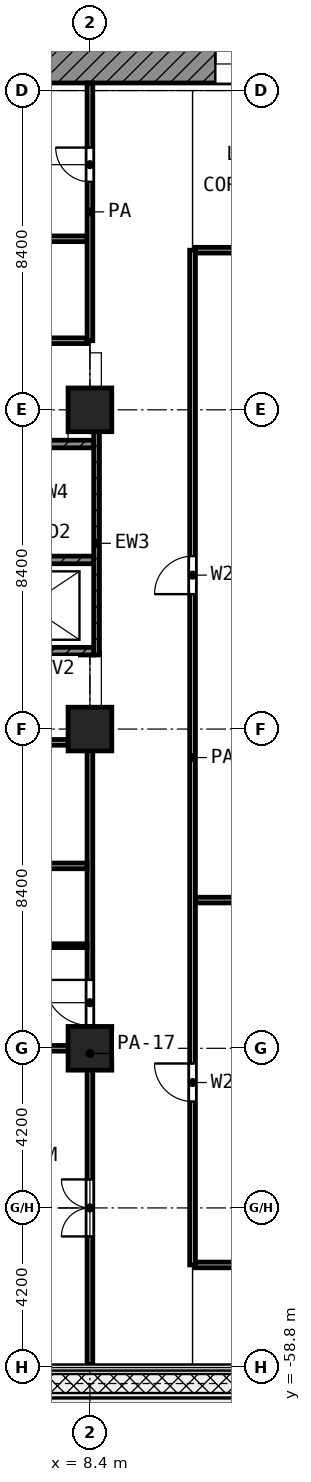
"""IFC4 building model, lengths in metres.
Left out: names, types, materials, properties, quantities, classifications, styles, units other than length and angle.
Written with IfcOpenShell. Run it as: python <this file> out.ifc"""

import sys

from ifc_helpers import new_model, si_unit, direction, frame, frame_2d, origin, origin_2d, place, context, subcontext, project, spatial, rectangle, extrude, element, fill, save


model = new_model("IFC4")
c1 = context("Model", 3, precision=1e-05, world=origin(), true_north=direction((0.0, 1.0)))
c2 = subcontext(c1, "Body", "Model", "MODEL_VIEW")
j1 = project(units=[si_unit("LENGTHUNIT", "METRE"), si_unit("PLANEANGLEUNIT", "RADIAN")], contexts=[c1])
p1 = place(None, origin())
s1 = spatial("IfcSite", under=j1, at=p1, CompositionType="ELEMENT")
p2 = place(p1, origin())
s2 = spatial("IfcBuilding", under=s1, at=p2, CompositionType="ELEMENT")
p3 = place(p2, frame((0.0, 0.0, 115.6)))
s3 = spatial("IfcBuildingStorey", under=s2, at=p3, CompositionType="ELEMENT", Elevation=115.6)
for number, where, z_axis, x_axis in (
    (1, (8.4, -33.6, 0.0), (0.0, 0.0, 1.0), (1.0, 0.0, 0.0)),
    (2, (8.4, -42.0, 0.0), (0.0, 0.0, 1.0), (1.0, 0.0, 0.0)),
    (3, (8.4, -50.4, 0.0), (0.0, 0.0, 1.0), (1.0, 0.0, 0.0)),
):
    element("IfcColumn", number, at=place(p3, frame(where, z_axis=z_axis, x_axis=x_axis)), inside=s3, PredefinedType="COLUMN", context=c2, shape_type="SweptSolid", body=[
        extrude(rectangle(XDim=1.15, YDim=1.15, at=origin_2d()), origin(), (0.0, 0.0, 1.0), 4.2),
    ])
p4 = place(p3, frame((5.4, -24.5, 0.0), z_axis=(0.0, 0.0, 1.0), x_axis=(1.0, 0.0, 0.0)))
e4 = element("IfcWall", 4, at=p4, inside=s3, PredefinedType="SHEAR", context=c2, shape_type="SweptSolid", body=[
    extrude(rectangle(XDim=18.6, YDim=1.0, at=frame_2d((9.3, 0.0))), origin(), (0.0, 0.0, 1.0), 3.6),
])
p5 = place(p4, frame((6.3, 0.0, 0.0)))
e5 = element("IfcOpeningElement", 5, at=p5, cuts=e4, PredefinedType="OPENING", context=c2, shape_type="SweptSolid", body=[
    extrude(rectangle(XDim=1.8, YDim=2.1, at=frame_2d((0.9, 1.05))), frame((0.0, 0.51, 0.0), z_axis=(0.0, -1.0, 0.0), x_axis=(1.0, 0.0, 0.0)), (0.0, 0.0, 1.0), 1.02),
])
p6 = place(p3, frame((8.575, -40.05, 0.0), z_axis=(0.0, 0.0, 1.0), x_axis=(0.0, 1.0, 0.0)))
e6 = element("IfcWall", 6, at=p6, inside=s3, PredefinedType="SHEAR", context=c2, shape_type="SweptSolid", body=[
    extrude(rectangle(XDim=5.875, YDim=0.15, at=frame_2d((2.938, 0.0))), origin(), (0.0, 0.0, 1.0), 3.6),
])
p7 = place(p3, frame((0.45, -34.5, 0.0), z_axis=(0.0, 0.0, 1.0), x_axis=(1.0, 0.0, 0.0)))
e7 = element("IfcWall", 7, at=p7, inside=s3, PredefinedType="SHEAR", context=c2, shape_type="SweptSolid", body=[
    extrude(rectangle(XDim=8.05, YDim=0.2, at=frame_2d((4.025, 0.0))), origin(), (0.0, 0.0, 1.0), 3.6),
])
p8 = place(p7, frame((0.75, 0.0, 0.0)))
e8 = element("IfcOpeningElement", 8, at=p8, cuts=e7, PredefinedType="OPENING", context=c2, shape_type="SweptSolid", body=[
    extrude(rectangle(XDim=1.1, YDim=2.1, at=frame_2d((0.55, 1.05))), frame((0.0, 0.11, 0.0), z_axis=(0.0, -1.0, 0.0), x_axis=(1.0, 0.0, 0.0)), (0.0, 0.0, 1.0), 0.22),
])
p9 = place(p3, frame((0.45, -37.55, 0.0), z_axis=(0.0, 0.0, 1.0), x_axis=(1.0, 0.0, 0.0)))
e9 = element("IfcWall", 9, at=p9, inside=s3, PredefinedType="SHEAR", context=c2, shape_type="SweptSolid", body=[
    extrude(rectangle(XDim=8.05, YDim=0.2, at=frame_2d((4.025, 0.0))), origin(), (0.0, 0.0, 1.0), 3.6),
])
p10 = place(p9, frame((0.1, 0.0, 0.0)))
e10 = element("IfcOpeningElement", 10, at=p10, cuts=e9, PredefinedType="OPENING", context=c2, shape_type="SweptSolid", body=[
    extrude(rectangle(XDim=1.1, YDim=2.1, at=frame_2d((0.55, 1.05))), frame((0.0, 0.11, 0.0), z_axis=(0.0, -1.0, 0.0), x_axis=(1.0, 0.0, 0.0)), (0.0, 0.0, 1.0), 0.22),
])
p11 = place(p3, frame((0.45, -39.95, 0.0), z_axis=(0.0, 0.0, 1.0), x_axis=(1.0, 0.0, 0.0)))
e11 = element("IfcWall", 11, at=p11, inside=s3, PredefinedType="SHEAR", context=c2, shape_type="SweptSolid", body=[
    extrude(rectangle(XDim=8.05, YDim=0.2, at=frame_2d((4.025, 0.0))), origin(), (0.0, 0.0, 1.0), 3.6),
])
p12 = place(p11, frame((2.0, 0.0, 0.0)))
e12 = element("IfcOpeningElement", 12, at=p12, cuts=e11, PredefinedType="OPENING", context=c2, shape_type="SweptSolid", body=[
    extrude(rectangle(XDim=1.1, YDim=2.1, at=frame_2d((0.55, 1.05))), frame((0.0, 0.11, 0.0), z_axis=(0.0, -1.0, 0.0), x_axis=(1.0, 0.0, 0.0)), (0.0, 0.0, 1.0), 0.22),
])
p13 = place(p3, frame((5.75, -47.7, 0.0), z_axis=(0.0, 0.0, 1.0), x_axis=(1.0, 0.0, 0.0)))
e13 = element("IfcWall", 13, at=p13, inside=s3, PredefinedType="PARTITIONING", context=c2, shape_type="SweptSolid", body=[
    extrude(rectangle(XDim=2.575, YDim=0.1, at=frame_2d((1.288, 0.0))), origin(), (0.0, 0.0, 1.0), 3.6),
])
p14 = place(p3, frame((11.175, -56.1, 0.0), z_axis=(0.0, 0.0, 1.0), x_axis=(1.0, 0.0, 0.0)))
e14 = element("IfcWall", 14, at=p14, inside=s3, PredefinedType="PARTITIONING", context=c2, shape_type="SweptSolid", body=[
    extrude(rectangle(XDim=2.85, YDim=0.15, at=frame_2d((1.425, 0.0))), origin(), (0.0, 0.0, 1.0), 3.6),
])
p15 = place(p3, frame((0.08, -50.4, 0.0), z_axis=(0.0, 0.0, 1.0), x_axis=(1.0, 0.0, 0.0)))
e15 = element("IfcWall", 15, at=p15, inside=s3, PredefinedType="PARTITIONING", context=c2, shape_type="SweptSolid", body=[
    extrude(rectangle(XDim=8.245, YDim=0.15, at=frame_2d((4.123, 0.0))), origin(), (0.0, 0.0, 1.0), 3.6),
])
p16 = place(p3, frame((11.175, -46.5, 0.0), z_axis=(0.0, 0.0, 1.0), x_axis=(1.0, 0.0, 0.0)))
e16 = element("IfcWall", 16, at=p16, inside=s3, PredefinedType="PARTITIONING", context=c2, shape_type="SweptSolid", body=[
    extrude(rectangle(XDim=2.85, YDim=0.15, at=frame_2d((1.425, 0.0))), origin(), (0.0, 0.0, 1.0), 3.6),
])
p17 = place(p3, frame((0.08, -45.6, 0.0), z_axis=(0.0, 0.0, 1.0), x_axis=(1.0, 0.0, 0.0)))
e17 = element("IfcWall", 17, at=p17, inside=s3, PredefinedType="PARTITIONING", context=c2, shape_type="SweptSolid", body=[
    extrude(rectangle(XDim=8.245, YDim=0.15, at=frame_2d((4.123, 0.0))), origin(), (0.0, 0.0, 1.0), 3.6),
])
p18 = place(p3, frame((2.327, -42.35, 0.0), z_axis=(0.0, 0.0, 1.0), x_axis=(1.0, 0.0, 0.0)))
e18 = element("IfcWall", 18, at=p18, inside=s3, PredefinedType="PARTITIONING", context=c2, shape_type="SweptSolid", body=[
    extrude(rectangle(XDim=5.998, YDim=0.15, at=frame_2d((2.999, 0.0))), origin(), (0.0, 0.0, 1.0), 3.6),
])
p19 = place(p18, frame((2.499, 0.0, 0.0)))
e19 = element("IfcOpeningElement", 19, at=p19, cuts=e18, PredefinedType="OPENING", context=c2, shape_type="SweptSolid", body=[
    extrude(rectangle(XDim=1.0, YDim=2.1, at=frame_2d((0.5, 1.05))), frame((0.0, 0.085, 0.0), z_axis=(0.0, -1.0, 0.0), x_axis=(1.0, 0.0, 0.0)), (0.0, 0.0, 1.0), 0.17),
])
p20 = place(p3, frame((1.077, -31.782, 0.0), z_axis=(0.0, 0.0, 1.0), x_axis=(1.0, 0.0, 0.0)))
e20 = element("IfcWall", 20, at=p20, inside=s3, PredefinedType="PARTITIONING", context=c2, shape_type="SweptSolid", body=[
    extrude(rectangle(XDim=7.248, YDim=0.15, at=frame_2d((3.624, 0.0))), origin(), (0.0, 0.0, 1.0), 3.6),
])
p21 = place(p20, frame((3.024, 0.0, 0.0)))
e21 = element("IfcOpeningElement", 21, at=p21, cuts=e20, PredefinedType="OPENING", context=c2, shape_type="SweptSolid", body=[
    extrude(rectangle(XDim=1.2, YDim=2.1, at=frame_2d((0.6, 1.05))), frame((0.0, 0.085, 0.0), z_axis=(0.0, -1.0, 0.0), x_axis=(1.0, 0.0, 0.0)), (0.0, 0.0, 1.0), 0.17),
])
p22 = place(p3, frame((11.175, -29.4, 0.0), z_axis=(0.0, 0.0, 1.0), x_axis=(1.0, 0.0, 0.0)))
e22 = element("IfcWall", 22, at=p22, inside=s3, PredefinedType="PARTITIONING", context=c2, shape_type="SweptSolid", body=[
    extrude(rectangle(XDim=2.85, YDim=0.15, at=frame_2d((1.425, 0.0))), origin(), (0.0, 0.0, 1.0), 3.6),
])
p23 = place(p3, frame((0.08, -29.1, 0.0), z_axis=(0.0, 0.0, 1.0), x_axis=(1.0, 0.0, 0.0)))
e23 = element("IfcWall", 23, at=p23, inside=s3, PredefinedType="PARTITIONING", context=c2, shape_type="SweptSolid", body=[
    extrude(rectangle(XDim=8.245, YDim=0.15, at=frame_2d((4.123, 0.0))), origin(), (0.0, 0.0, 1.0), 3.6),
])
p24 = place(p3, frame((8.4, -58.72, 0.0), z_axis=(0.0, 0.0, 1.0), x_axis=(0.0, 1.0, 0.0)))
e24 = element("IfcWall", 24, at=p24, inside=s3, PredefinedType="PARTITIONING", context=c2, shape_type="SweptSolid", body=[
    extrude(rectangle(XDim=16.37, YDim=0.15, at=frame_2d((8.185, 0.0))), origin(), (0.0, 0.0, 1.0), 2.7),
])
p25 = place(p24, frame((8.92, 0.0, 0.0)))
e25 = element("IfcOpeningElement", 25, at=p25, cuts=e24, PredefinedType="OPENING", context=c2, shape_type="SweptSolid", body=[
    extrude(rectangle(XDim=1.2, YDim=2.1, at=frame_2d((0.6, 1.05))), frame((0.0, 0.085, 0.0), z_axis=(0.0, -1.0, 0.0), x_axis=(1.0, 0.0, 0.0)), (0.0, 0.0, 1.0), 0.17),
])
p26 = place(p24, frame((3.37, 0.0, 0.0)))
e26 = element("IfcOpeningElement", 26, at=p26, cuts=e24, PredefinedType="OPENING", context=c2, shape_type="SweptSolid", body=[
    extrude(rectangle(XDim=1.5, YDim=2.1, at=frame_2d((0.75, 1.05))), frame((0.0, 0.085, 0.0), z_axis=(0.0, -1.0, 0.0), x_axis=(1.0, 0.0, 0.0)), (0.0, 0.0, 1.0), 0.17),
])
p27 = place(p3, frame((8.4, -31.782, 0.0), z_axis=(0.0, 0.0, 1.0), x_axis=(0.0, 1.0, 0.0)))
e27 = element("IfcWall", 27, at=p27, inside=s3, PredefinedType="PARTITIONING", context=c2, shape_type="SweptSolid", body=[
    extrude(rectangle(XDim=6.782, YDim=0.15, at=frame_2d((3.391, 0.0))), origin(), (0.0, 0.0, 1.0), 3.6),
])
p28 = place(p27, frame((4.182, 0.0, 0.0)))
e28 = element("IfcOpeningElement", 28, at=p28, cuts=e27, PredefinedType="OPENING", context=c2, shape_type="SweptSolid", body=[
    extrude(rectangle(XDim=0.9, YDim=2.1, at=frame_2d((0.45, 1.05))), frame((0.0, 0.085, 0.0), z_axis=(0.0, -1.0, 0.0), x_axis=(1.0, 0.0, 0.0)), (0.0, 0.0, 1.0), 0.17),
])
p29 = place(p3, frame((11.1, -56.1, 0.0), z_axis=(0.0, 0.0, 1.0), x_axis=(0.0, 1.0, 0.0)))
e29 = element("IfcWall", 29, at=p29, inside=s3, PredefinedType="PARTITIONING", context=c2, shape_type="SweptSolid", body=[
    extrude(rectangle(XDim=26.7, YDim=0.15, at=frame_2d((13.35, 0.0))), origin(), (0.0, 0.0, 1.0), 3.6),
])
p30 = place(p29, frame((17.65, 0.0, 0.0)))
e30 = element("IfcOpeningElement", 30, at=p30, cuts=e29, PredefinedType="OPENING", context=c2, shape_type="SweptSolid", body=[
    extrude(rectangle(XDim=1.0, YDim=2.1, at=frame_2d((0.5, 1.05))), frame((0.0, 0.085, 0.0), z_axis=(0.0, -1.0, 0.0), x_axis=(1.0, 0.0, 0.0)), (0.0, 0.0, 1.0), 0.17),
])
p31 = place(p29, frame((4.3, 0.0, 0.0)))
e31 = element("IfcOpeningElement", 31, at=p31, cuts=e29, PredefinedType="OPENING", context=c2, shape_type="SweptSolid", body=[
    extrude(rectangle(XDim=1.0, YDim=2.1, at=frame_2d((0.5, 1.05))), frame((0.0, 0.085, 0.0), z_axis=(0.0, -1.0, 0.0), x_axis=(1.0, 0.0, 0.0)), (0.0, 0.0, 1.0), 0.17),
])
p32 = place(p5, origin())
e32 = element("IfcDoor", 32, at=p32, inside=s3, OperationType="DOUBLE_DOOR_SINGLE_SWING", PredefinedType="DOOR", context=c2, shape_type="SweptSolid", body=[
    extrude(rectangle(XDim=1.8, YDim=2.1, at=frame_2d((0.9, 1.05))), frame((0.0, 0.025, 0.0), z_axis=(0.0, -1.0, 0.0), x_axis=(1.0, 0.0, 0.0)), (0.0, 0.0, 1.0), 0.05),
])
fill(e5, e32)
p33 = place(p28, origin())
e33 = element("IfcDoor", 33, at=p33, inside=s3, OperationType="SINGLE_SWING_RIGHT", PredefinedType="DOOR", context=c2, shape_type="SweptSolid", body=[
    extrude(rectangle(XDim=0.9, YDim=2.1, at=frame_2d((0.45, 1.05))), frame((0.0, 0.025, 0.0), z_axis=(0.0, -1.0, 0.0), x_axis=(1.0, 0.0, 0.0)), (0.0, 0.0, 1.0), 0.05),
])
fill(e28, e33)
p34 = place(p25, origin())
e34 = element("IfcDoor", 34, at=p34, inside=s3, OperationType="SINGLE_SWING_RIGHT", PredefinedType="DOOR", context=c2, shape_type="SweptSolid", body=[
    extrude(rectangle(XDim=1.2, YDim=2.1, at=frame_2d((0.6, 1.05))), frame((0.0, 0.025, 0.0), z_axis=(0.0, -1.0, 0.0), x_axis=(1.0, 0.0, 0.0)), (0.0, 0.0, 1.0), 0.05),
])
fill(e25, e34)
p35 = place(p26, origin())
e35 = element("IfcDoor", 35, at=p35, inside=s3, OperationType="DOUBLE_DOOR_SINGLE_SWING", PredefinedType="DOOR", context=c2, shape_type="SweptSolid", body=[
    extrude(rectangle(XDim=1.5, YDim=2.1, at=frame_2d((0.75, 1.05))), frame((0.0, 0.025, 0.0), z_axis=(0.0, -1.0, 0.0), x_axis=(1.0, 0.0, 0.0)), (0.0, 0.0, 1.0), 0.05),
])
fill(e26, e35)
p36 = place(p30, origin())
e36 = element("IfcDoor", 36, at=p36, inside=s3, OperationType="SINGLE_SWING_LEFT", PredefinedType="DOOR", context=c2, shape_type="SweptSolid", body=[
    extrude(rectangle(XDim=1.0, YDim=2.1, at=frame_2d((0.5, 1.05))), frame((0.0, 0.025, 0.0), z_axis=(0.0, -1.0, 0.0), x_axis=(1.0, 0.0, 0.0)), (0.0, 0.0, 1.0), 0.05),
])
fill(e30, e36)
p37 = place(p31, origin())
e37 = element("IfcDoor", 37, at=p37, inside=s3, OperationType="SINGLE_SWING_RIGHT", PredefinedType="DOOR", context=c2, shape_type="SweptSolid", body=[
    extrude(rectangle(XDim=1.0, YDim=2.1, at=frame_2d((0.5, 1.05))), frame((0.0, 0.025, 0.0), z_axis=(0.0, -1.0, 0.0), x_axis=(1.0, 0.0, 0.0)), (0.0, 0.0, 1.0), 0.05),
])
fill(e31, e37)
save(model, sys.argv[1])
